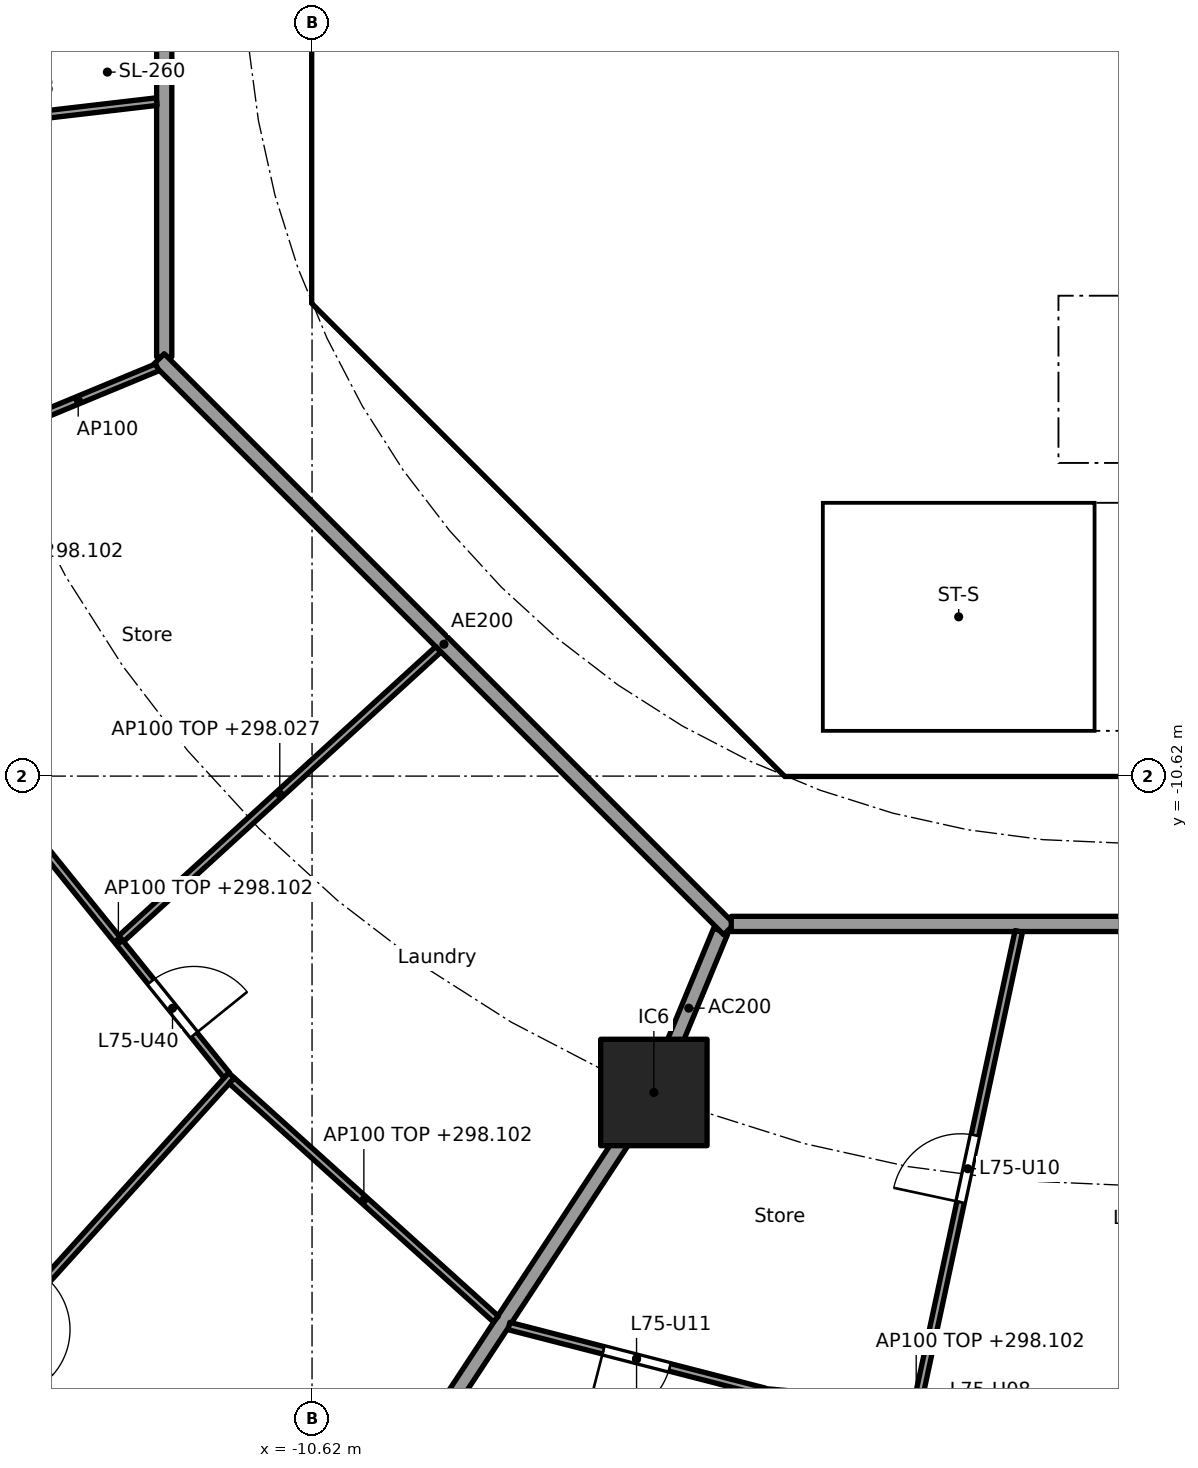
"""IFC4 building model, lengths in metres.
Left out: names, types, materials, properties, quantities, classifications, styles, units other than length and angle.
Written with IfcOpenShell. Run it as: python <this file> out.ifc"""

import sys

from ifc_helpers import new_model, si_unit, direction, frame, frame_2d, origin, origin_2d, place, context, subcontext, project, spatial, polyline, rectangle, outline, extrude, element, fill, save


model = new_model("IFC4")
c1 = context("Model", 3, precision=1e-05, world=origin(), true_north=direction((0.0, 1.0)))
c2 = subcontext(c1, "Body", "Model", "MODEL_VIEW")
j1 = project(units=[si_unit("LENGTHUNIT", "METRE"), si_unit("PLANEANGLEUNIT", "RADIAN")], contexts=[c1])
p1 = place(None, origin())
s1 = spatial("IfcSite", under=j1, at=p1, CompositionType="ELEMENT")
p2 = place(p1, origin())
s2 = spatial("IfcBuilding", under=s1, at=p2, CompositionType="ELEMENT")
p3 = place(p2, frame((0.0, 0.0, 295.5)))
s3 = spatial("IfcBuildingStorey", under=s2, at=p3, CompositionType="ELEMENT", Elevation=295.5)
p4 = place(p3, frame((-6.123, -14.782, 0.0), z_axis=(0.0, 0.0, 1.0), x_axis=(1.0, 0.0, 0.0)))
e1 = element("IfcColumn", 1, at=p4, inside=s3, PredefinedType="COLUMN", context=c2, shape_type="SweptSolid", body=[
    extrude(rectangle(XDim=1.4, YDim=1.4, at=origin_2d()), origin(), (0.0, 0.0, 1.0), 3.7),
])
p5 = place(p3, frame((-10.325, 3.801, 0.0), z_axis=(0.0, 0.0, 1.0), x_axis=(0.0, -1.0, 0.0)))
e2 = element("IfcWall", 2, at=p5, inside=s3, PredefinedType="SHEAR", context=c2, shape_type="SweptSolid", body=[
    extrude(rectangle(XDim=7.602, YDim=0.6, at=frame_2d((3.801, 0.0))), origin(), (0.0, 0.0, 1.0), 3.28),
])
p6 = place(p5, frame((0.651, 0.0, 0.0)))
e3 = element("IfcOpeningElement", 3, at=p6, cuts=e2, PredefinedType="OPENING", context=c2, shape_type="SweptSolid", body=[
    extrude(rectangle(XDim=1.5, YDim=2.1, at=frame_2d((0.75, 1.05))), frame((0.0, 0.31, 0.0), z_axis=(0.0, -1.0, 0.0), x_axis=(1.0, 0.0, 0.0)), (0.0, 0.0, 1.0), 0.62),
])
p7 = place(p5, frame((5.451, 0.0, 0.0)))
e4 = element("IfcOpeningElement", 4, at=p7, cuts=e2, PredefinedType="OPENING", context=c2, shape_type="SweptSolid", body=[
    extrude(rectangle(XDim=1.5, YDim=2.1, at=frame_2d((0.75, 1.05))), frame((0.0, 0.31, 0.0), z_axis=(0.0, -1.0, 0.0), x_axis=(1.0, 0.0, 0.0)), (0.0, 0.0, 1.0), 0.62),
])
p8 = place(p3, frame((-9.988, -4.613, 0.0), z_axis=(0.0, 0.0, 1.0), x_axis=(0.707106781187, -0.707106781187, 0.0)))
e5 = element("IfcWall", 5, at=p8, inside=s3, PredefinedType="SHEAR", context=c2, shape_type="SweptSolid", body=[
    extrude(rectangle(XDim=7.602, YDim=0.6, at=frame_2d((3.801, 0.0))), origin(), (0.0, 0.0, 1.0), 3.28),
])
p9 = place(p8, frame((6.151, 0.0, 0.0)))
e6 = element("IfcOpeningElement", 6, at=p9, cuts=e5, PredefinedType="OPENING", context=c2, shape_type="SweptSolid", body=[
    extrude(rectangle(XDim=1.1, YDim=2.1, at=frame_2d((0.55, 1.05))), frame((0.0, 0.31, 0.0), z_axis=(0.0, -1.0, 0.0), x_axis=(1.0, 0.0, 0.0)), (0.0, 0.0, 1.0), 0.62),
])
p10 = place(p3, frame((-5.8, -8.227, 0.0), z_axis=(0.0, 0.0, 1.0), x_axis=(0.0, 1.0, 0.0)))
e7 = element("IfcWall", 7, at=p10, inside=s3, PredefinedType="PARTITIONING", context=c2, shape_type="SweptSolid", body=[
    extrude(rectangle(XDim=3.927, YDim=0.15, at=frame_2d((1.963, 0.0))), origin(), (0.0, 0.0, 1.0), 3.28),
])
p11 = place(p10, frame((1.476, 0.0, 0.0)))
e8 = element("IfcOpeningElement", 8, at=p11, cuts=e7, PredefinedType="OPENING", context=c2, shape_type="SweptSolid", body=[
    extrude(rectangle(XDim=0.9, YDim=2.1, at=frame_2d((0.45, 1.05))), frame((0.0, 0.085, 0.0), z_axis=(0.0, -1.0, 0.0), x_axis=(1.0, 0.0, 0.0)), (0.0, 0.0, 1.0), 0.17),
])
p12 = place(p3, frame((-4.0, -6.5, 0.0), z_axis=(0.0, 0.0, 1.0), x_axis=(0.0, 1.0, 0.0)))
e9 = element("IfcWall", 9, at=p12, inside=s3, PredefinedType="SOLIDWALL", context=c2, shape_type="SweptSolid", body=[
    extrude(rectangle(XDim=2.2, YDim=0.2, at=frame_2d((1.1, 0.0))), origin(), (0.0, 0.0, 1.0), 3.28),
])
p13 = place(p12, frame((0.65, 0.0, 0.0)))
e10 = element("IfcOpeningElement", 10, at=p13, cuts=e9, PredefinedType="OPENING", context=c2, shape_type="SweptSolid", body=[
    extrude(rectangle(XDim=0.9, YDim=2.1, at=frame_2d((0.45, 1.05))), frame((0.0, 0.11, 0.0), z_axis=(0.0, -1.0, 0.0), x_axis=(1.0, 0.0, 0.0)), (0.0, 0.0, 1.0), 0.22),
])
p14 = place(p3, frame((-6.7, -2.0, 0.0), z_axis=(0.0, 0.0, 1.0), x_axis=(1.0, 0.0, 0.0)))
e11 = element("IfcWall", 11, at=p14, inside=s3, PredefinedType="SOLIDWALL", context=c2, shape_type="SweptSolid", body=[
    extrude(rectangle(XDim=13.4, YDim=0.2, at=frame_2d((6.7, 0.0))), origin(), (0.0, 0.0, 1.0), 3.28),
])
p15 = place(p14, frame((9.45, 0.0, 0.0)))
e12 = element("IfcOpeningElement", 12, at=p15, cuts=e11, PredefinedType="OPENING", context=c2, shape_type="SweptSolid", body=[
    extrude(rectangle(XDim=1.1, YDim=2.1, at=frame_2d((0.55, 1.05))), frame((0.0, 0.11, 0.0), z_axis=(0.0, -1.0, 0.0), x_axis=(1.0, 0.0, 0.0)), (0.0, 0.0, 1.0), 0.22),
])
p16 = place(p14, frame((11.65, 0.0, 0.0)))
e13 = element("IfcOpeningElement", 13, at=p16, cuts=e11, PredefinedType="OPENING", context=c2, shape_type="SweptSolid", body=[
    extrude(rectangle(XDim=1.1, YDim=2.1, at=frame_2d((0.55, 1.05))), frame((0.0, 0.11, 0.0), z_axis=(0.0, -1.0, 0.0), x_axis=(1.0, 0.0, 0.0)), (0.0, 0.0, 1.0), 0.22),
])
p17 = place(p14, frame((0.75, 0.0, 0.0)))
e14 = element("IfcOpeningElement", 14, at=p17, cuts=e11, PredefinedType="OPENING", context=c2, shape_type="SweptSolid", body=[
    extrude(rectangle(XDim=0.9, YDim=2.1, at=frame_2d((0.45, 1.05))), frame((0.0, 0.11, 0.0), z_axis=(0.0, -1.0, 0.0), x_axis=(1.0, 0.0, 0.0)), (0.0, 0.0, 1.0), 0.22),
])
p18 = place(p14, frame((2.95, 0.0, 0.0)))
e15 = element("IfcOpeningElement", 15, at=p18, cuts=e11, PredefinedType="OPENING", context=c2, shape_type="SweptSolid", body=[
    extrude(rectangle(XDim=0.9, YDim=2.1, at=frame_2d((0.45, 1.05))), frame((0.0, 0.11, 0.0), z_axis=(0.0, -1.0, 0.0), x_axis=(1.0, 0.0, 0.0)), (0.0, 0.0, 1.0), 0.22),
])
p19 = place(p14, frame((6.25, 0.0, 0.0)))
e16 = element("IfcOpeningElement", 16, at=p19, cuts=e11, PredefinedType="OPENING", context=c2, shape_type="SweptSolid", body=[
    extrude(rectangle(XDim=0.9, YDim=2.1, at=frame_2d((0.45, 1.05))), frame((0.0, 0.11, 0.0), z_axis=(0.0, -1.0, 0.0), x_axis=(1.0, 0.0, 0.0)), (0.0, 0.0, 1.0), 0.22),
])
p20 = place(p3, origin())
e17 = element("IfcWall", 17, at=p20, inside=s3, PredefinedType="SHEAR", context=c2, shape_type="SweptSolid", body=[
    extrude(outline(polyline([(-10.625, -3.801), (-10.025, -3.801), (-10.025, -4.152), (-9.776, -4.401), (-10.2, -4.825), (-10.625, -4.401), (-10.625, -3.801)])), origin(), (0.0, 0.0, 1.0), 3.28),
])
p21 = place(p3, origin())
e18 = element("IfcWall", 18, at=p21, inside=s3, PredefinedType="SHEAR", context=c2, shape_type="SweptSolid", body=[
    extrude(outline(polyline([(-4.152, -10.025), (4.152, -10.025), (4.401, -9.776), (4.825, -10.2), (4.401, -10.625), (-4.401, -10.625), (-4.825, -10.2), (-4.401, -9.776), (-4.152, -10.025)])), origin(), (0.0, 0.0, 1.0), 3.28),
])
p22 = place(p3, frame((-0.9, -6.5, 0.0), z_axis=(0.0, 0.0, 1.0), x_axis=(0.0, 1.0, 0.0)))
e19 = element("IfcWall", 19, at=p22, inside=s3, PredefinedType="SOLIDWALL", context=c2, shape_type="SweptSolid", body=[
    extrude(rectangle(XDim=2.2, YDim=0.2, at=frame_2d((1.1, 0.0))), origin(), (0.0, 0.0, 1.0), 3.28),
])
p23 = place(p3, origin())
e20 = element("IfcWall", 20, at=p23, inside=s3, PredefinedType="SOLIDWALL", context=c2, shape_type="SweptSolid", body=[
    extrude(outline(polyline([(-6.7, -2.1), (-6.5, -2.1), (-6.5, -4.1), (-4.5, -4.1), (-4.5, -2.1), (-4.3, -2.1), (-4.3, -4.1), (-2.3, -4.1), (-2.3, -2.1), (-2.1, -2.1), (-2.1, -4.1), (2.1, -4.1), (2.1, -2.1), (2.3, -2.1), (2.3, -4.1), (4.3, -4.1), (4.3, -2.1), (4.5, -2.1), (4.5, -4.1), (6.5, -4.1), (6.5, -2.1), (6.7, -2.1), (6.7, -4.3), (-6.7, -4.3), (-6.7, -2.1)])), origin(), (0.0, 0.0, 1.0), 3.28),
])
p24 = place(p3, frame((-10.025, -4.0, 0.0), z_axis=(0.0, 0.0, 1.0), x_axis=(1.0, 0.0, 0.0)))
e21 = element("IfcWall", 21, at=p24, inside=s3, PredefinedType="PARTITIONING", context=c2, shape_type="SweptSolid", body=[
    extrude(rectangle(XDim=3.325, YDim=0.2, at=frame_2d((1.662, 0.0))), origin(), (0.0, 0.0, 1.0), 3.28),
])
p25 = place(p3, origin())
e22 = element("IfcWall", 22, at=p25, inside=s3, PredefinedType="SOLIDWALL", context=c2, shape_type="SweptSolid", body=[
    extrude(outline(polyline([(-3.9, -10.025), (-4.1, -10.025), (-4.1, -7.025), (-3.9, -7.025), (-3.9, -10.025)])), origin(), (0.0, 0.0, 1.0), 3.28),
])
p26 = place(p3, origin())
e23 = element("IfcWall", 23, at=p26, inside=s3, PredefinedType="SOLIDWALL", context=c2, shape_type="SweptSolid", body=[
    extrude(outline(polyline([(4.1, -7.025), (-4.1, -7.025), (-4.1, -6.5), (4.1, -6.5), (4.1, -7.025)])), origin(), (0.0, 0.0, 1.0), 3.28),
])
p27 = place(p3, frame((-5.243, -12.657, 0.0), z_axis=(0.0, 0.0, 1.0), x_axis=(-0.382770106157, -0.923843626288, 0.0)))
e24 = element("IfcWall", 24, at=p27, inside=s3, PredefinedType="PARTITIONING", context=c2, shape_type="SweptSolid", body=[
    extrude(rectangle(XDim=2.199, YDim=0.2, at=frame_2d((1.1, 0.0))), origin(), (0.0, 0.0, 1.0), 3.28),
])
p28 = place(p3, frame((-6.151, -14.824, 0.0), z_axis=(0.0, 0.0, 1.0), x_axis=(-0.549345577828, -0.835595258556, 0.0)))
e25 = element("IfcWall", 25, at=p28, inside=s3, PredefinedType="PARTITIONING", context=c2, shape_type="SweptSolid", body=[
    extrude(rectangle(XDim=11.62, YDim=0.2, at=frame_2d((5.81, 0.0))), origin(), (0.0, 0.0, 1.0), 2.602),
])
p29 = place(p3, frame((-12.565, 5.304, 0.0), z_axis=(0.0, 0.0, 1.0), x_axis=(0.0, -1.0, 0.0)))
e26 = element("IfcWall", 26, at=p29, inside=s3, PredefinedType="PARTITIONING", context=c2, shape_type="SweptSolid", body=[
    extrude(rectangle(XDim=10.409, YDim=0.2, at=frame_2d((5.205, 0.0))), origin(), (0.0, 0.0, 1.0), 3.28),
])
p30 = place(p29, frame((4.804, 0.0, 0.0)))
e27 = element("IfcOpeningElement", 27, at=p30, cuts=e26, PredefinedType="OPENING", context=c2, shape_type="SweptSolid", body=[
    extrude(rectangle(XDim=1.0, YDim=2.1, at=frame_2d((0.5, 1.05))), frame((0.0, 0.11, 0.0), z_axis=(0.0, -1.0, 0.0), x_axis=(1.0, 0.0, 0.0)), (0.0, 0.0, 1.0), 0.22),
])
p31 = place(p3, frame((-12.635, -5.134, 0.0), z_axis=(0.0, 0.0, 1.0), x_axis=(0.707106781187, -0.707106781187, 0.0)))
e28 = element("IfcWall", 28, at=p31, inside=s3, PredefinedType="PARTITIONING", context=c2, shape_type="SweptSolid", body=[
    extrude(rectangle(XDim=10.609, YDim=0.2, at=frame_2d((5.305, 0.0))), origin(), (0.0, 0.0, 1.0), 3.28),
])
p32 = place(p3, frame((-5.104, -12.565, 0.0), z_axis=(0.0, 0.0, 1.0), x_axis=(1.0, 0.0, 0.0)))
e29 = element("IfcWall", 29, at=p32, inside=s3, PredefinedType="PARTITIONING", context=c2, shape_type="SweptSolid", body=[
    extrude(rectangle(XDim=10.409, YDim=0.2, at=frame_2d((5.205, 0.0))), origin(), (0.0, 0.0, 1.0), 3.28),
])
p33 = place(p3, frame((-12.664, -1.746, 0.0), z_axis=(0.0, 0.0, 1.0), x_axis=(-0.993265121683, -0.115863704621, 0.0)))
e30 = element("IfcWall", 30, at=p33, inside=s3, PredefinedType="PARTITIONING", context=c2, shape_type="SweptSolid", body=[
    extrude(rectangle(XDim=4.724, YDim=0.1, at=frame_2d((2.362, 0.0))), origin(), (0.0, 0.0, 1.0), 2.527),
])
p34 = place(p33, frame((1.887, 0.0, 0.0)))
e31 = element("IfcOpeningElement", 31, at=p34, cuts=e30, PredefinedType="OPENING", context=c2, shape_type="SweptSolid", body=[
    extrude(rectangle(XDim=0.9, YDim=2.1, at=frame_2d((0.45, 1.05))), frame((0.0, 0.06, 0.0), z_axis=(0.0, -1.0, 0.0), x_axis=(1.0, 0.0, 0.0)), (0.0, 0.0, 1.0), 0.12),
])
p35 = place(p3, frame((-12.657, -5.243, 0.0), z_axis=(0.0, 0.0, 1.0), x_axis=(-0.923871314276, -0.382703272338, 0.0)))
e32 = element("IfcWall", 32, at=p35, inside=s3, PredefinedType="PARTITIONING", context=c2, shape_type="SweptSolid", body=[
    extrude(rectangle(XDim=2.249, YDim=0.1, at=frame_2d((1.125, 0.0))), origin(), (0.0, 0.0, 1.0), 3.28),
])
p36 = place(p3, frame((-14.591, -11.029, 0.0), z_axis=(0.0, 0.0, 1.0), x_axis=(0.628170338674, -0.778075848237, 0.0)))
e33 = element("IfcWall", 33, at=p36, inside=s3, PredefinedType="PARTITIONING", context=c2, shape_type="SweptSolid", body=[
    extrude(rectangle(XDim=4.532, YDim=0.1, at=frame_2d((2.266, 0.0))), origin(), (0.0, 0.0, 1.0), 2.602),
])
p37 = place(p36, frame((2.949, 0.0, 0.0)))
e34 = element("IfcOpeningElement", 34, at=p37, cuts=e33, PredefinedType="OPENING", context=c2, shape_type="SweptSolid", body=[
    extrude(rectangle(XDim=0.9, YDim=2.1, at=frame_2d((0.45, 1.05))), frame((0.0, 0.06, 0.0), z_axis=(0.0, -1.0, 0.0), x_axis=(1.0, 0.0, 0.0)), (0.0, 0.0, 1.0), 0.12),
])
p38 = place(p3, frame((-8.958, -8.952, 0.0), z_axis=(0.0, 0.0, 1.0), x_axis=(-0.73876526954, -0.673962815385, 0.0)))
e35 = element("IfcWall", 35, at=p38, inside=s3, PredefinedType="PARTITIONING", context=c2, shape_type="SweptSolid", body=[
    extrude(rectangle(XDim=5.647, YDim=0.1, at=frame_2d((2.824, 0.0))), origin(), (0.0, 0.0, 1.0), 2.527),
])
p39 = place(p3, frame((-11.679, -14.557, 0.0), z_axis=(0.0, 0.0, 1.0), x_axis=(-0.670800011545, -0.741638284146, 0.0)))
e36 = element("IfcWall", 36, at=p39, inside=s3, PredefinedType="PARTITIONING", context=c2, shape_type="SweptSolid", body=[
    extrude(rectangle(XDim=8.068, YDim=0.1, at=frame_2d((4.034, 0.0))), origin(), (0.0, 0.0, 1.0), 2.602),
])
p40 = place(p39, frame((3.609, 0.0, 0.0)))
e37 = element("IfcOpeningElement", 37, at=p40, cuts=e36, PredefinedType="OPENING", context=c2, shape_type="SweptSolid", body=[
    extrude(rectangle(XDim=0.9, YDim=2.1, at=frame_2d((0.45, 1.05))), frame((0.0, 0.06, 0.0), z_axis=(0.0, -1.0, 0.0), x_axis=(1.0, 0.0, 0.0)), (0.0, 0.0, 1.0), 0.12),
])
p41 = place(p3, frame((-11.676, -14.628, 0.0), z_axis=(0.0, 0.0, 1.0), x_axis=(0.74245829867, -0.669892285921, 0.0)))
e38 = element("IfcWall", 38, at=p41, inside=s3, PredefinedType="PARTITIONING", context=c2, shape_type="SweptSolid", body=[
    extrude(rectangle(XDim=4.68, YDim=0.1, at=frame_2d((2.34, 0.0))), origin(), (0.0, 0.0, 1.0), 2.602),
])
p42 = place(p3, frame((-8.03, -17.854, 0.0), z_axis=(0.0, 0.0, 1.0), x_axis=(0.968441967324, -0.249239154077, 0.0)))
e39 = element("IfcWall", 39, at=p42, inside=s3, PredefinedType="PARTITIONING", context=c2, shape_type="SweptSolid", body=[
    extrude(rectangle(XDim=3.468, YDim=0.1, at=frame_2d((1.734, 0.0))), origin(), (0.0, 0.0, 1.0), 2.602),
])
p43 = place(p42, frame((1.284, 0.0, 0.0)))
e40 = element("IfcOpeningElement", 40, at=p43, cuts=e39, PredefinedType="OPENING", context=c2, shape_type="SweptSolid", body=[
    extrude(rectangle(XDim=0.9, YDim=2.1, at=frame_2d((0.45, 1.05))), frame((0.0, 0.06, 0.0), z_axis=(0.0, -1.0, 0.0), x_axis=(1.0, 0.0, 0.0)), (0.0, 0.0, 1.0), 0.12),
])
p44 = place(p3, frame((-4.673, -18.727, 0.0), z_axis=(0.0, 0.0, 1.0), x_axis=(0.995982840882, -0.089544294447, 0.0)))
e41 = element("IfcWall", 41, at=p44, inside=s3, PredefinedType="PARTITIONING", context=c2, shape_type="SweptSolid", body=[
    extrude(rectangle(XDim=4.019, YDim=0.1, at=frame_2d((2.009, 0.0))), origin(), (0.0, 0.0, 1.0), 2.602),
])
p45 = place(p44, frame((2.539, 0.0, 0.0)))
e42 = element("IfcOpeningElement", 42, at=p45, cuts=e41, PredefinedType="OPENING", context=c2, shape_type="SweptSolid", body=[
    extrude(rectangle(XDim=0.9, YDim=2.1, at=frame_2d((0.45, 1.05))), frame((0.0, 0.06, 0.0), z_axis=(0.0, -1.0, 0.0), x_axis=(1.0, 0.0, 0.0)), (0.0, 0.0, 1.0), 0.12),
])
p46 = place(p3, frame((-1.322, -12.663, 0.0), z_axis=(0.0, 0.0, 1.0), x_axis=(-0.209957681159, -0.97771047459, 0.0)))
e43 = element("IfcWall", 43, at=p46, inside=s3, PredefinedType="PARTITIONING", context=c2, shape_type="SweptSolid", body=[
    extrude(rectangle(XDim=16.299, YDim=0.1, at=frame_2d((8.149, 0.0))), origin(), (0.0, 0.0, 1.0), 2.527),
])
p47 = place(p46, frame((2.744, 0.0, 0.0)))
e44 = element("IfcOpeningElement", 44, at=p47, cuts=e43, PredefinedType="OPENING", context=c2, shape_type="SweptSolid", body=[
    extrude(rectangle(XDim=0.9, YDim=2.1, at=frame_2d((0.45, 1.05))), frame((0.0, 0.06, 0.0), z_axis=(0.0, -1.0, 0.0), x_axis=(1.0, 0.0, 0.0)), (0.0, 0.0, 1.0), 0.12),
])
p48 = place(p11, origin())
e45 = element("IfcDoor", 45, at=p48, inside=s3, OperationType="SINGLE_SWING_LEFT", PredefinedType="DOOR", context=c2, shape_type="SweptSolid", body=[
    extrude(rectangle(XDim=0.9, YDim=2.1, at=frame_2d((0.45, 1.05))), frame((0.0, 0.025, 0.0), z_axis=(0.0, -1.0, 0.0), x_axis=(1.0, 0.0, 0.0)), (0.0, 0.0, 1.0), 0.05),
])
fill(e8, e45)
p49 = place(p13, frame((0.9, 0.0, 0.0), x_axis=(-1.0, 0.0, 0.0)))
e46 = element("IfcDoor", 46, at=p49, inside=s3, OperationType="SINGLE_SWING_RIGHT", PredefinedType="DOOR", context=c2, shape_type="SweptSolid", body=[
    extrude(rectangle(XDim=0.9, YDim=2.1, at=frame_2d((0.45, 1.05))), frame((0.0, 0.025, 0.0), z_axis=(0.0, -1.0, 0.0), x_axis=(1.0, 0.0, 0.0)), (0.0, 0.0, 1.0), 0.05),
])
fill(e10, e46)
p50 = place(p17, frame((0.9, 0.0, 0.0), x_axis=(-1.0, 0.0, 0.0)))
e47 = element("IfcDoor", 47, at=p50, inside=s3, OperationType="SINGLE_SWING_LEFT", PredefinedType="DOOR", context=c2, shape_type="SweptSolid", body=[
    extrude(rectangle(XDim=0.9, YDim=2.1, at=frame_2d((0.45, 1.05))), frame((0.0, 0.025, 0.0), z_axis=(0.0, -1.0, 0.0), x_axis=(1.0, 0.0, 0.0)), (0.0, 0.0, 1.0), 0.05),
])
fill(e14, e47)
p51 = place(p18, frame((0.9, 0.0, 0.0), x_axis=(-1.0, 0.0, 0.0)))
e48 = element("IfcDoor", 48, at=p51, inside=s3, OperationType="SINGLE_SWING_LEFT", PredefinedType="DOOR", context=c2, shape_type="SweptSolid", body=[
    extrude(rectangle(XDim=0.9, YDim=2.1, at=frame_2d((0.45, 1.05))), frame((0.0, 0.025, 0.0), z_axis=(0.0, -1.0, 0.0), x_axis=(1.0, 0.0, 0.0)), (0.0, 0.0, 1.0), 0.05),
])
fill(e15, e48)
p52 = place(p19, frame((0.9, 0.0, 0.0), x_axis=(-1.0, 0.0, 0.0)))
e49 = element("IfcDoor", 49, at=p52, inside=s3, OperationType="SINGLE_SWING_LEFT", PredefinedType="DOOR", context=c2, shape_type="SweptSolid", body=[
    extrude(rectangle(XDim=0.9, YDim=2.1, at=frame_2d((0.45, 1.05))), frame((0.0, 0.025, 0.0), z_axis=(0.0, -1.0, 0.0), x_axis=(1.0, 0.0, 0.0)), (0.0, 0.0, 1.0), 0.05),
])
fill(e16, e49)
p53 = place(p7, origin())
e50 = element("IfcDoor", 50, at=p53, inside=s3, OperationType="DOUBLE_DOOR_SINGLE_SWING", PredefinedType="DOOR", context=c2, shape_type="SweptSolid", body=[
    extrude(rectangle(XDim=1.5, YDim=2.1, at=frame_2d((0.75, 1.05))), frame((0.0, 0.025, 0.0), z_axis=(0.0, -1.0, 0.0), x_axis=(1.0, 0.0, 0.0)), (0.0, 0.0, 1.0), 0.05),
])
fill(e4, e50)
p54 = place(p9, origin())
e51 = element("IfcDoor", 51, at=p54, inside=s3, OperationType="SINGLE_SWING_RIGHT", PredefinedType="DOOR", context=c2, shape_type="SweptSolid", body=[
    extrude(rectangle(XDim=1.1, YDim=2.1, at=frame_2d((0.55, 1.05))), frame((0.0, 0.025, 0.0), z_axis=(0.0, -1.0, 0.0), x_axis=(1.0, 0.0, 0.0)), (0.0, 0.0, 1.0), 0.05),
])
fill(e6, e51)
p55 = place(p47, frame((0.9, 0.0, 0.0), x_axis=(-1.0, 0.0, 0.0)))
e52 = element("IfcDoor", 52, at=p55, inside=s3, OperationType="SINGLE_SWING_LEFT", PredefinedType="DOOR", context=c2, shape_type="SweptSolid", body=[
    extrude(rectangle(XDim=0.9, YDim=2.1, at=frame_2d((0.45, 1.05))), frame((0.0, 0.025, 0.0), z_axis=(0.0, -1.0, 0.0), x_axis=(1.0, 0.0, 0.0)), (0.0, 0.0, 1.0), 0.05),
])
fill(e44, e52)
p56 = place(p43, frame((0.9, 0.0, 0.0), x_axis=(-1.0, 0.0, 0.0)))
e53 = element("IfcDoor", 53, at=p56, inside=s3, OperationType="SINGLE_SWING_RIGHT", PredefinedType="DOOR", context=c2, shape_type="SweptSolid", body=[
    extrude(rectangle(XDim=0.9, YDim=2.1, at=frame_2d((0.45, 1.05))), frame((0.0, 0.025, 0.0), z_axis=(0.0, -1.0, 0.0), x_axis=(1.0, 0.0, 0.0)), (0.0, 0.0, 1.0), 0.05),
])
fill(e40, e53)
p57 = place(p37, origin())
e54 = element("IfcDoor", 54, at=p57, inside=s3, OperationType="SINGLE_SWING_RIGHT", PredefinedType="DOOR", context=c2, shape_type="SweptSolid", body=[
    extrude(rectangle(XDim=0.9, YDim=2.1, at=frame_2d((0.45, 1.05))), frame((0.0, 0.025, 0.0), z_axis=(0.0, -1.0, 0.0), x_axis=(1.0, 0.0, 0.0)), (0.0, 0.0, 1.0), 0.05),
])
fill(e34, e54)
save(model, sys.argv[1])
